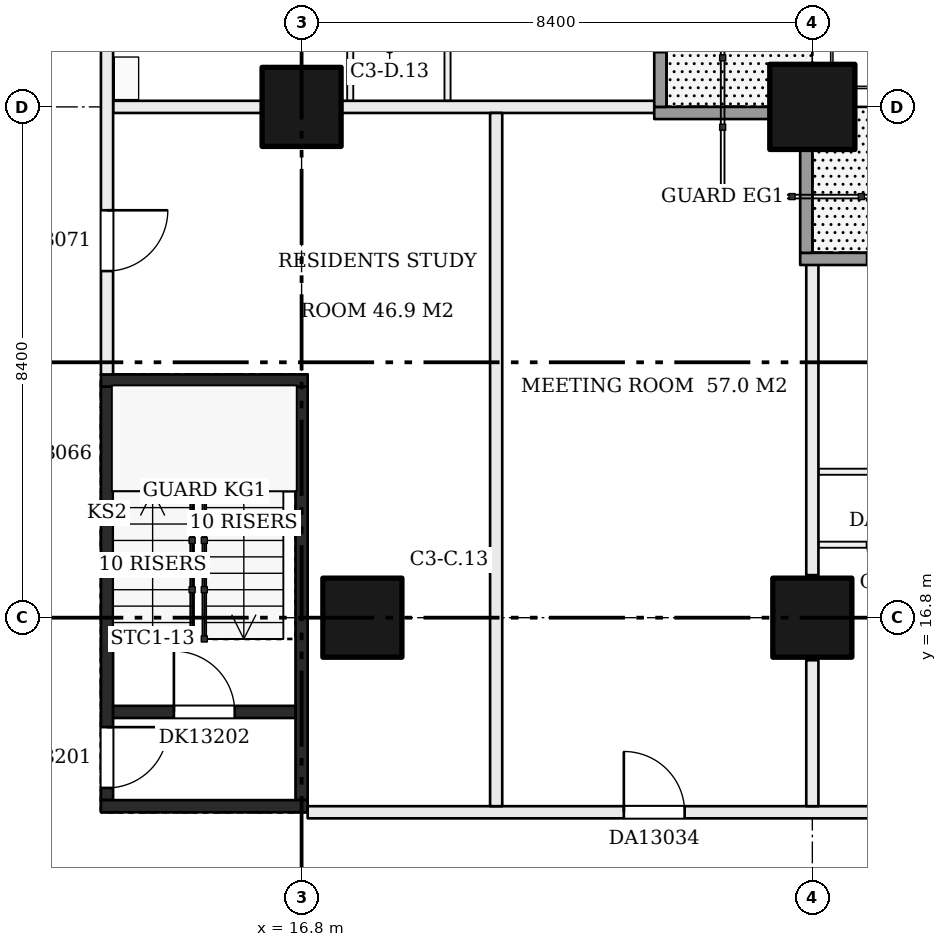
"""IFC4 building model, lengths in metres.
Left out: names, types, materials, properties, quantities, classifications, styles, units other than length and angle.
Written with IfcOpenShell. Run it as: python <this file> out.ifc"""

import sys

from ifc_helpers import new_model, si_unit, direction, frame, frame_2d, origin, origin_2d, place, context, subcontext, project, spatial, rectangle, extrude, element, fill, save


model = new_model("IFC4")
c1 = context("Model", 3, precision=1e-05, world=origin(), true_north=direction((0.0, 1.0)))
c2 = subcontext(c1, "Body", "Model", "MODEL_VIEW")
j1 = project(units=[si_unit("LENGTHUNIT", "METRE"), si_unit("PLANEANGLEUNIT", "RADIAN")], contexts=[c1])
p1 = place(None, origin())
s1 = spatial("IfcSite", under=j1, at=p1, CompositionType="ELEMENT")
p2 = place(p1, origin())
s2 = spatial("IfcBuilding", under=s1, at=p2, CompositionType="ELEMENT")
p3 = place(p2, frame((0.0, 0.0, 56.7)))
s3 = spatial("IfcBuildingStorey", under=s2, at=p3, CompositionType="ELEMENT", Elevation=56.7)
for number, where, z_axis, x_axis in (
    (1, (17.8, 16.8, 0.0), (0.0, 0.0, 1.0), (1.0, 0.0, 0.0)),
    (2, (16.8, 25.2, 0.0), (0.0, 0.0, 1.0), (1.0, 0.0, 0.0)),
    (3, (25.2, 16.8, 0.0), (0.0, 0.0, 1.0), (1.0, 0.0, 0.0)),
):
    element("IfcColumn", number, at=place(p3, frame(where, z_axis=z_axis, x_axis=x_axis)), inside=s3, PredefinedType="COLUMN", context=c2, shape_type="SweptSolid", body=[
        extrude(rectangle(XDim=1.3, YDim=1.3, at=origin_2d()), origin(), (0.0, 0.0, 1.0), 3.22),
    ])
p4 = place(p3, frame((25.2, 25.2, 0.0), z_axis=(0.0, 0.0, 1.0), x_axis=(1.0, 0.0, 0.0)))
e4 = element("IfcColumn", 4, at=p4, inside=s3, PredefinedType="COLUMN", context=c2, shape_type="SweptSolid", body=[
    extrude(rectangle(XDim=1.4, YDim=1.4, at=origin_2d()), origin(), (0.0, 0.0, 1.0), 3.22),
])
p5 = place(p3, frame((13.6, 13.8, 0.0), z_axis=(0.0, 0.0, 1.0), x_axis=(0.0, 1.0, 0.0)))
e5 = element("IfcWall", 5, at=p5, inside=s3, PredefinedType="SHEAR", context=c2, shape_type="SweptSolid", body=[
    extrude(rectangle(XDim=6.8, YDim=0.2, at=frame_2d((3.4, 0.0))), origin(), (0.0, 0.0, 1.0), 3.22),
])
p6 = place(p5, frame((0.2, 0.0, 0.0)))
e6 = element("IfcOpeningElement", 6, at=p6, cuts=e5, PredefinedType="OPENING", context=c2, shape_type="SweptSolid", body=[
    extrude(rectangle(XDim=1.0, YDim=2.1, at=frame_2d((0.5, 1.05))), frame((0.0, 0.11, 0.0), z_axis=(0.0, -1.0, 0.0), x_axis=(1.0, 0.0, 0.0)), (0.0, 0.0, 1.0), 0.22),
])
p7 = place(p3, frame((16.8, 13.8, 0.0), z_axis=(0.0, 0.0, 1.0), x_axis=(0.0, 1.0, 0.0)))
e7 = element("IfcWall", 7, at=p7, inside=s3, PredefinedType="SHEAR", context=c2, shape_type="SweptSolid", body=[
    extrude(rectangle(XDim=6.8, YDim=0.2, at=frame_2d((3.4, 0.0))), origin(), (0.0, 0.0, 1.0), 3.22),
])
for number, where, z_axis, x_axis in (
    (8, (13.5, 13.7, 0.0), (0.0, 0.0, 1.0), (1.0, 0.0, 0.0)),
    (9, (13.5, 20.7, 0.0), (0.0, 0.0, 1.0), (1.0, 0.0, 0.0)),
):
    element("IfcWall", number, at=place(p3, frame(where, z_axis=z_axis, x_axis=x_axis)), inside=s3, PredefinedType="SHEAR", context=c2, shape_type="SweptSolid", body=[
        extrude(rectangle(XDim=3.4, YDim=0.2, at=frame_2d((1.7, 0.0))), origin(), (0.0, 0.0, 1.0), 3.22),
    ])
p8 = place(p3, frame((13.7, 15.25, 0.0), z_axis=(0.0, 0.0, 1.0), x_axis=(1.0, 0.0, 0.0)))
e10 = element("IfcWall", 10, at=p8, inside=s3, PredefinedType="SHEAR", context=c2, shape_type="SweptSolid", body=[
    extrude(rectangle(XDim=3.0, YDim=0.2, at=frame_2d((1.5, 0.0))), origin(), (0.0, 0.0, 1.0), 3.22),
])
p9 = place(p8, frame((1.0, 0.0, 0.0)))
e11 = element("IfcOpeningElement", 11, at=p9, cuts=e10, PredefinedType="OPENING", context=c2, shape_type="SweptSolid", body=[
    extrude(rectangle(XDim=1.0, YDim=2.1, at=frame_2d((0.5, 1.05))), frame((0.0, 0.11, 0.0), z_axis=(0.0, -1.0, 0.0), x_axis=(1.0, 0.0, 0.0)), (0.0, 0.0, 1.0), 0.22),
])
p10 = place(p3, frame((16.9, 13.6, 0.0), z_axis=(0.0, 0.0, 1.0), x_axis=(1.0, 0.0, 0.0)))
e12 = element("IfcWall", 12, at=p10, inside=s3, PredefinedType="PARTITIONING", context=c2, shape_type="SweptSolid", body=[
    extrude(rectangle(XDim=25.1, YDim=0.2, at=frame_2d((12.55, 0.0))), origin(), (0.0, 0.0, 1.0), 3.22),
])
p11 = place(p10, frame((18.9, 0.0, 0.0)))
e13 = element("IfcOpeningElement", 13, at=p11, cuts=e12, PredefinedType="OPENING", context=c2, shape_type="SweptSolid", body=[
    extrude(rectangle(XDim=1.0, YDim=2.1, at=frame_2d((0.5, 1.05))), frame((0.0, 0.11, 0.0), z_axis=(0.0, -1.0, 0.0), x_axis=(1.0, 0.0, 0.0)), (0.0, 0.0, 1.0), 0.22),
])
p12 = place(p10, frame((21.4, 0.0, 0.0)))
e14 = element("IfcOpeningElement", 14, at=p12, cuts=e12, PredefinedType="OPENING", context=c2, shape_type="SweptSolid", body=[
    extrude(rectangle(XDim=1.0, YDim=2.1, at=frame_2d((0.5, 1.05))), frame((0.0, 0.11, 0.0), z_axis=(0.0, -1.0, 0.0), x_axis=(1.0, 0.0, 0.0)), (0.0, 0.0, 1.0), 0.22),
])
p13 = place(p10, frame((5.2, 0.0, 0.0)))
e15 = element("IfcOpeningElement", 15, at=p13, cuts=e12, PredefinedType="OPENING", context=c2, shape_type="SweptSolid", body=[
    extrude(rectangle(XDim=1.0, YDim=2.1, at=frame_2d((0.5, 1.05))), frame((0.0, 0.11, 0.0), z_axis=(0.0, -1.0, 0.0), x_axis=(1.0, 0.0, 0.0)), (0.0, 0.0, 1.0), 0.22),
])
p14 = place(p3, frame((25.3, 18.0, 0.0), z_axis=(0.0, 0.0, 1.0), x_axis=(1.0, 0.0, 0.0)))
e16 = element("IfcWall", 16, at=p14, inside=s3, PredefinedType="PARTITIONING", context=c2, shape_type="SweptSolid", body=[
    extrude(rectangle(XDim=12.4, YDim=0.1, at=frame_2d((6.2, 0.0))), origin(), (0.0, 0.0, 1.0), 3.22),
])
p15 = place(p14, frame((10.5, 0.0, 0.0)))
e17 = element("IfcOpeningElement", 17, at=p15, cuts=e16, PredefinedType="OPENING", context=c2, shape_type="SweptSolid", body=[
    extrude(rectangle(XDim=0.9, YDim=2.1, at=frame_2d((0.45, 1.05))), frame((0.0, 0.06, 0.0), z_axis=(0.0, -1.0, 0.0), x_axis=(1.0, 0.0, 0.0)), (0.0, 0.0, 1.0), 0.12),
])
p16 = place(p14, frame((0.8, 0.0, 0.0)))
e18 = element("IfcOpeningElement", 18, at=p16, cuts=e16, PredefinedType="OPENING", context=c2, shape_type="SweptSolid", body=[
    extrude(rectangle(XDim=0.9, YDim=2.1, at=frame_2d((0.45, 1.05))), frame((0.0, 0.06, 0.0), z_axis=(0.0, -1.0, 0.0), x_axis=(1.0, 0.0, 0.0)), (0.0, 0.0, 1.0), 0.12),
])
p17 = place(p14, frame((3.6, 0.0, 0.0)))
e19 = element("IfcOpeningElement", 19, at=p17, cuts=e16, PredefinedType="OPENING", context=c2, shape_type="SweptSolid", body=[
    extrude(rectangle(XDim=0.9, YDim=2.1, at=frame_2d((0.45, 1.05))), frame((0.0, 0.06, 0.0), z_axis=(0.0, -1.0, 0.0), x_axis=(1.0, 0.0, 0.0)), (0.0, 0.0, 1.0), 0.12),
])
p18 = place(p14, frame((6.8, 0.0, 0.0)))
e20 = element("IfcOpeningElement", 20, at=p18, cuts=e16, PredefinedType="OPENING", context=c2, shape_type="SweptSolid", body=[
    extrude(rectangle(XDim=0.9, YDim=2.1, at=frame_2d((0.45, 1.05))), frame((0.0, 0.06, 0.0), z_axis=(0.0, -1.0, 0.0), x_axis=(1.0, 0.0, 0.0)), (0.0, 0.0, 1.0), 0.12),
])
p19 = place(p3, frame((25.3, 19.2, 0.0), z_axis=(0.0, 0.0, 1.0), x_axis=(1.0, 0.0, 0.0)))
e21 = element("IfcWall", 21, at=p19, inside=s3, PredefinedType="PARTITIONING", context=c2, shape_type="SweptSolid", body=[
    extrude(rectangle(XDim=12.4, YDim=0.1, at=frame_2d((6.2, 0.0))), origin(), (0.0, 0.0, 1.0), 3.22),
])
p20 = place(p19, frame((3.6, 0.0, 0.0)))
e22 = element("IfcOpeningElement", 22, at=p20, cuts=e21, PredefinedType="OPENING", context=c2, shape_type="SweptSolid", body=[
    extrude(rectangle(XDim=0.9, YDim=2.1, at=frame_2d((0.45, 1.05))), frame((0.0, 0.06, 0.0), z_axis=(0.0, -1.0, 0.0), x_axis=(1.0, 0.0, 0.0)), (0.0, 0.0, 1.0), 0.12),
])
p21 = place(p19, frame((9.9, 0.0, 0.0)))
e23 = element("IfcOpeningElement", 23, at=p21, cuts=e21, PredefinedType="OPENING", context=c2, shape_type="SweptSolid", body=[
    extrude(rectangle(XDim=0.9, YDim=2.1, at=frame_2d((0.45, 1.05))), frame((0.0, 0.06, 0.0), z_axis=(0.0, -1.0, 0.0), x_axis=(1.0, 0.0, 0.0)), (0.0, 0.0, 1.0), 0.12),
])
p22 = place(p3, frame((13.7, 25.2, 0.0), z_axis=(0.0, 0.0, 1.0), x_axis=(1.0, 0.0, 0.0)))
e24 = element("IfcWall", 24, at=p22, inside=s3, PredefinedType="PARTITIONING", context=c2, shape_type="SweptSolid", body=[
    extrude(rectangle(XDim=9.0, YDim=0.2, at=frame_2d((4.5, 0.0))), origin(), (0.0, 0.0, 1.0), 3.22),
])
p23 = place(p3, frame((13.6, 20.8, 0.0), z_axis=(0.0, 0.0, 1.0), x_axis=(0.0, 1.0, 0.0)))
e25 = element("IfcWall", 25, at=p23, inside=s3, PredefinedType="PARTITIONING", context=c2, shape_type="SweptSolid", body=[
    extrude(rectangle(XDim=21.2, YDim=0.2, at=frame_2d((10.6, 0.0))), origin(), (0.0, 0.0, 1.0), 3.22),
])
p24 = place(p23, frame((11.2, 0.0, 0.0)))
e26 = element("IfcOpeningElement", 26, at=p24, cuts=e25, PredefinedType="OPENING", context=c2, shape_type="SweptSolid", body=[
    extrude(rectangle(XDim=1.0, YDim=2.1, at=frame_2d((0.5, 1.05))), frame((0.0, 0.11, 0.0), z_axis=(0.0, -1.0, 0.0), x_axis=(1.0, 0.0, 0.0)), (0.0, 0.0, 1.0), 0.22),
])
p25 = place(p23, frame((17.5, 0.0, 0.0)))
e27 = element("IfcOpeningElement", 27, at=p25, cuts=e25, PredefinedType="OPENING", context=c2, shape_type="SweptSolid", body=[
    extrude(rectangle(XDim=1.0, YDim=2.1, at=frame_2d((0.5, 1.05))), frame((0.0, 0.11, 0.0), z_axis=(0.0, -1.0, 0.0), x_axis=(1.0, 0.0, 0.0)), (0.0, 0.0, 1.0), 0.22),
])
p26 = place(p23, frame((1.7, 0.0, 0.0)))
e28 = element("IfcOpeningElement", 28, at=p26, cuts=e25, PredefinedType="OPENING", context=c2, shape_type="SweptSolid", body=[
    extrude(rectangle(XDim=1.0, YDim=2.1, at=frame_2d((0.5, 1.05))), frame((0.0, 0.11, 0.0), z_axis=(0.0, -1.0, 0.0), x_axis=(1.0, 0.0, 0.0)), (0.0, 0.0, 1.0), 0.22),
])
p27 = place(p3, frame((17.6, 25.3, 0.0), z_axis=(0.0, 0.0, 1.0), x_axis=(0.0, 1.0, 0.0)))
e29 = element("IfcWall", 29, at=p27, inside=s3, PredefinedType="PARTITIONING", context=c2, shape_type="SweptSolid", body=[
    extrude(rectangle(XDim=12.4, YDim=0.1, at=frame_2d((6.2, 0.0))), origin(), (0.0, 0.0, 1.0), 3.22),
])
p28 = place(p27, frame((6.5, 0.0, 0.0)))
e30 = element("IfcOpeningElement", 30, at=p28, cuts=e29, PredefinedType="OPENING", context=c2, shape_type="SweptSolid", body=[
    extrude(rectangle(XDim=0.9, YDim=2.1, at=frame_2d((0.45, 1.05))), frame((0.0, 0.06, 0.0), z_axis=(0.0, -1.0, 0.0), x_axis=(1.0, 0.0, 0.0)), (0.0, 0.0, 1.0), 0.12),
])
p29 = place(p27, frame((1.0, 0.0, 0.0)))
e31 = element("IfcOpeningElement", 31, at=p29, cuts=e29, PredefinedType="OPENING", context=c2, shape_type="SweptSolid", body=[
    extrude(rectangle(XDim=0.9, YDim=2.1, at=frame_2d((0.45, 1.05))), frame((0.0, 0.06, 0.0), z_axis=(0.0, -1.0, 0.0), x_axis=(1.0, 0.0, 0.0)), (0.0, 0.0, 1.0), 0.12),
])
p30 = place(p27, frame((4.0, 0.0, 0.0)))
e32 = element("IfcOpeningElement", 32, at=p30, cuts=e29, PredefinedType="OPENING", context=c2, shape_type="SweptSolid", body=[
    extrude(rectangle(XDim=0.9, YDim=2.1, at=frame_2d((0.45, 1.05))), frame((0.0, 0.06, 0.0), z_axis=(0.0, -1.0, 0.0), x_axis=(1.0, 0.0, 0.0)), (0.0, 0.0, 1.0), 0.12),
])
p31 = place(p27, frame((10.1, 0.0, 0.0)))
e33 = element("IfcOpeningElement", 33, at=p31, cuts=e29, PredefinedType="OPENING", context=c2, shape_type="SweptSolid", body=[
    extrude(rectangle(XDim=0.9, YDim=2.1, at=frame_2d((0.45, 1.05))), frame((0.0, 0.06, 0.0), z_axis=(0.0, -1.0, 0.0), x_axis=(1.0, 0.0, 0.0)), (0.0, 0.0, 1.0), 0.12),
])
p32 = place(p3, frame((19.2, 25.3, 0.0), z_axis=(0.0, 0.0, 1.0), x_axis=(0.0, 1.0, 0.0)))
e34 = element("IfcWall", 34, at=p32, inside=s3, PredefinedType="PARTITIONING", context=c2, shape_type="SweptSolid", body=[
    extrude(rectangle(XDim=12.4, YDim=0.1, at=frame_2d((6.2, 0.0))), origin(), (0.0, 0.0, 1.0), 3.22),
])
p33 = place(p32, frame((3.6, 0.0, 0.0)))
e35 = element("IfcOpeningElement", 35, at=p33, cuts=e34, PredefinedType="OPENING", context=c2, shape_type="SweptSolid", body=[
    extrude(rectangle(XDim=0.9, YDim=2.1, at=frame_2d((0.45, 1.05))), frame((0.0, 0.06, 0.0), z_axis=(0.0, -1.0, 0.0), x_axis=(1.0, 0.0, 0.0)), (0.0, 0.0, 1.0), 0.12),
])
p34 = place(p32, frame((9.9, 0.0, 0.0)))
e36 = element("IfcOpeningElement", 36, at=p34, cuts=e34, PredefinedType="OPENING", context=c2, shape_type="SweptSolid", body=[
    extrude(rectangle(XDim=0.9, YDim=2.1, at=frame_2d((0.45, 1.05))), frame((0.0, 0.06, 0.0), z_axis=(0.0, -1.0, 0.0), x_axis=(1.0, 0.0, 0.0)), (0.0, 0.0, 1.0), 0.12),
])
p35 = place(p3, frame((20.0, 13.7, 0.0), z_axis=(0.0, 0.0, 1.0), x_axis=(0.0, 1.0, 0.0)))
e37 = element("IfcWall", 37, at=p35, inside=s3, PredefinedType="PARTITIONING", context=c2, shape_type="SweptSolid", body=[
    extrude(rectangle(XDim=11.4, YDim=0.2, at=frame_2d((5.7, 0.0))), origin(), (0.0, 0.0, 1.0), 3.22),
])
p36 = place(p3, frame((25.2, 13.7, 0.0), z_axis=(0.0, 0.0, 1.0), x_axis=(0.0, 1.0, 0.0)))
e38 = element("IfcWall", 38, at=p36, inside=s3, PredefinedType="PARTITIONING", context=c2, shape_type="SweptSolid", body=[
    extrude(rectangle(XDim=2.4, YDim=0.2, at=frame_2d((1.2, 0.0))), origin(), (0.0, 0.0, 1.0), 3.22),
])
p37 = place(p3, frame((25.2, 17.5, 0.0), z_axis=(0.0, 0.0, 1.0), x_axis=(0.0, 1.0, 0.0)))
e39 = element("IfcWall", 39, at=p37, inside=s3, PredefinedType="PARTITIONING", context=c2, shape_type="SweptSolid", body=[
    extrude(rectangle(XDim=5.2, YDim=0.2, at=frame_2d((2.6, 0.0))), origin(), (0.0, 0.0, 1.0), 3.22),
])
p38 = place(p3, frame((42.0, 22.7, 0.0), z_axis=(0.0, 0.0, 1.0), x_axis=(-1.0, 0.0, 0.0)))
e40 = element("IfcWall", 40, at=p38, inside=s3, PredefinedType="SOLIDWALL", context=c2, shape_type="SweptSolid", body=[
    extrude(rectangle(XDim=17.0, YDim=0.2, at=frame_2d((8.5, 0.0))), origin(), (0.0, 0.0, 1.0), 3.22),
])
p39 = place(p38, frame((13.5, 0.0, 0.0)))
e41 = element("IfcOpeningElement", 41, at=p39, cuts=e40, PredefinedType="OPENING", context=c2, shape_type="SweptSolid", body=[
    extrude(rectangle(XDim=2.4, YDim=2.2, at=frame_2d((1.2, 1.1))), frame((0.0, 0.11, 0.0), z_axis=(0.0, -1.0, 0.0), x_axis=(1.0, 0.0, 0.0)), (0.0, 0.0, 1.0), 0.22),
])
p40 = place(p38, frame((9.3, 0.0, 0.0)))
e42 = element("IfcOpeningElement", 42, at=p40, cuts=e40, PredefinedType="OPENING", context=c2, shape_type="SweptSolid", body=[
    extrude(rectangle(XDim=2.4, YDim=2.2, at=frame_2d((1.2, 1.1))), frame((0.0, 0.11, 0.0), z_axis=(0.0, -1.0, 0.0), x_axis=(1.0, 0.0, 0.0)), (0.0, 0.0, 1.0), 0.22),
])
p41 = place(p38, frame((5.1, 0.0, 0.9)))
e43 = element("IfcOpeningElement", 43, at=p41, cuts=e40, PredefinedType="OPENING", context=c2, shape_type="SweptSolid", body=[
    extrude(rectangle(XDim=2.4, YDim=1.5, at=frame_2d((1.2, 0.75))), frame((0.0, 0.11, 0.0), z_axis=(0.0, -1.0, 0.0), x_axis=(1.0, 0.0, 0.0)), (0.0, 0.0, 1.0), 0.22),
])
p42 = place(p38, frame((0.9, 0.0, 0.0)))
e44 = element("IfcOpeningElement", 44, at=p42, cuts=e40, PredefinedType="OPENING", context=c2, shape_type="SweptSolid", body=[
    extrude(rectangle(XDim=2.4, YDim=2.2, at=frame_2d((1.2, 1.1))), frame((0.0, 0.11, 0.0), z_axis=(0.0, -1.0, 0.0), x_axis=(1.0, 0.0, 0.0)), (0.0, 0.0, 1.0), 0.22),
])
p43 = place(p3, frame((25.1, 22.8, 0.0), z_axis=(0.0, 0.0, 1.0), x_axis=(0.0, 1.0, 0.0)))
e45 = element("IfcWall", 45, at=p43, inside=s3, PredefinedType="SOLIDWALL", context=c2, shape_type="SweptSolid", body=[
    extrude(rectangle(XDim=1.7, YDim=0.2, at=frame_2d((0.85, 0.0))), origin(), (0.0, 0.0, 1.0), 3.22),
])
p44 = place(p3, frame((24.5, 25.1, 0.0), z_axis=(0.0, 0.0, 1.0), x_axis=(-1.0, 0.0, 0.0)))
e46 = element("IfcWall", 46, at=p44, inside=s3, PredefinedType="SOLIDWALL", context=c2, shape_type="SweptSolid", body=[
    extrude(rectangle(XDim=1.9, YDim=0.2, at=frame_2d((0.95, 0.0))), origin(), (0.0, 0.0, 1.0), 3.22),
])
p45 = place(p3, frame((22.7, 25.2, 0.0), z_axis=(0.0, 0.0, 1.0), x_axis=(0.0, 1.0, 0.0)))
e47 = element("IfcWall", 47, at=p45, inside=s3, PredefinedType="SOLIDWALL", context=c2, shape_type="SweptSolid", body=[
    extrude(rectangle(XDim=16.8, YDim=0.2, at=frame_2d((8.4, 0.0))), origin(), (0.0, 0.0, 1.0), 3.22),
])
p46 = place(p45, frame((0.9, 0.0, 0.0)))
e48 = element("IfcOpeningElement", 48, at=p46, cuts=e47, PredefinedType="OPENING", context=c2, shape_type="SweptSolid", body=[
    extrude(rectangle(XDim=2.4, YDim=2.2, at=frame_2d((1.2, 1.1))), frame((0.0, 0.11, 0.0), z_axis=(0.0, -1.0, 0.0), x_axis=(1.0, 0.0, 0.0)), (0.0, 0.0, 1.0), 0.22),
])
p47 = place(p45, frame((5.1, 0.0, 0.0)))
e49 = element("IfcOpeningElement", 49, at=p47, cuts=e47, PredefinedType="OPENING", context=c2, shape_type="SweptSolid", body=[
    extrude(rectangle(XDim=2.4, YDim=2.2, at=frame_2d((1.2, 1.1))), frame((0.0, 0.11, 0.0), z_axis=(0.0, -1.0, 0.0), x_axis=(1.0, 0.0, 0.0)), (0.0, 0.0, 1.0), 0.22),
])
p48 = place(p45, frame((9.3, 0.0, 0.9)))
e50 = element("IfcOpeningElement", 50, at=p48, cuts=e47, PredefinedType="OPENING", context=c2, shape_type="SweptSolid", body=[
    extrude(rectangle(XDim=2.4, YDim=1.5, at=frame_2d((1.2, 0.75))), frame((0.0, 0.11, 0.0), z_axis=(0.0, -1.0, 0.0), x_axis=(1.0, 0.0, 0.0)), (0.0, 0.0, 1.0), 0.22),
])
p49 = place(p45, frame((13.5, 0.0, 0.0)))
e51 = element("IfcOpeningElement", 51, at=p49, cuts=e47, PredefinedType="OPENING", context=c2, shape_type="SweptSolid", body=[
    extrude(rectangle(XDim=2.4, YDim=2.2, at=frame_2d((1.2, 1.1))), frame((0.0, 0.11, 0.0), z_axis=(0.0, -1.0, 0.0), x_axis=(1.0, 0.0, 0.0)), (0.0, 0.0, 1.0), 0.22),
])
p50 = place(p6, frame((1.0, 0.0, 0.0), z_axis=(0.0, 0.0, 1.0), x_axis=(-1.0, 0.0, 0.0)))
e52 = element("IfcDoor", 52, at=p50, inside=s3, OperationType="SINGLE_SWING_LEFT", PredefinedType="DOOR", context=c2, shape_type="SweptSolid", body=[
    extrude(rectangle(XDim=1.0, YDim=2.1, at=frame_2d((0.5, 1.05))), frame((0.0, 0.025, 0.0), z_axis=(0.0, -1.0, 0.0), x_axis=(1.0, 0.0, 0.0)), (0.0, 0.0, 1.0), 0.05),
])
fill(e6, e52)
p51 = place(p9, origin())
e53 = element("IfcDoor", 53, at=p51, inside=s3, OperationType="SINGLE_SWING_LEFT", PredefinedType="DOOR", context=c2, shape_type="SweptSolid", body=[
    extrude(rectangle(XDim=1.0, YDim=2.1, at=frame_2d((0.5, 1.05))), frame((0.0, 0.025, 0.0), z_axis=(0.0, -1.0, 0.0), x_axis=(1.0, 0.0, 0.0)), (0.0, 0.0, 1.0), 0.05),
])
fill(e11, e53)
p52 = place(p13, origin())
e54 = element("IfcDoor", 54, at=p52, inside=s3, OperationType="SINGLE_SWING_LEFT", PredefinedType="DOOR", context=c2, shape_type="SweptSolid", body=[
    extrude(rectangle(XDim=1.0, YDim=2.1, at=frame_2d((0.5, 1.05))), frame((0.0, 0.025, 0.0), z_axis=(0.0, -1.0, 0.0), x_axis=(1.0, 0.0, 0.0)), (0.0, 0.0, 1.0), 0.05),
])
fill(e15, e54)
p53 = place(p26, frame((1.0, 0.0, 0.0), z_axis=(0.0, 0.0, 1.0), x_axis=(-1.0, 0.0, 0.0)))
e55 = element("IfcDoor", 55, at=p53, inside=s3, OperationType="SINGLE_SWING_LEFT", PredefinedType="DOOR", context=c2, shape_type="SweptSolid", body=[
    extrude(rectangle(XDim=1.0, YDim=2.1, at=frame_2d((0.5, 1.05))), frame((0.0, 0.025, 0.0), z_axis=(0.0, -1.0, 0.0), x_axis=(1.0, 0.0, 0.0)), (0.0, 0.0, 1.0), 0.05),
])
fill(e28, e55)
p54 = place(p46, origin())
e56 = element("IfcDoor", 56, at=p54, inside=s3, OperationType="DOUBLE_DOOR_SLIDING", PredefinedType="DOOR", context=c2, shape_type="SweptSolid", body=[
    extrude(rectangle(XDim=2.4, YDim=2.2, at=frame_2d((1.2, 1.1))), frame((0.0, 0.025, 0.0), z_axis=(0.0, -1.0, 0.0), x_axis=(1.0, 0.0, 0.0)), (0.0, 0.0, 1.0), 0.05),
])
fill(e48, e56)
save(model, sys.argv[1])
